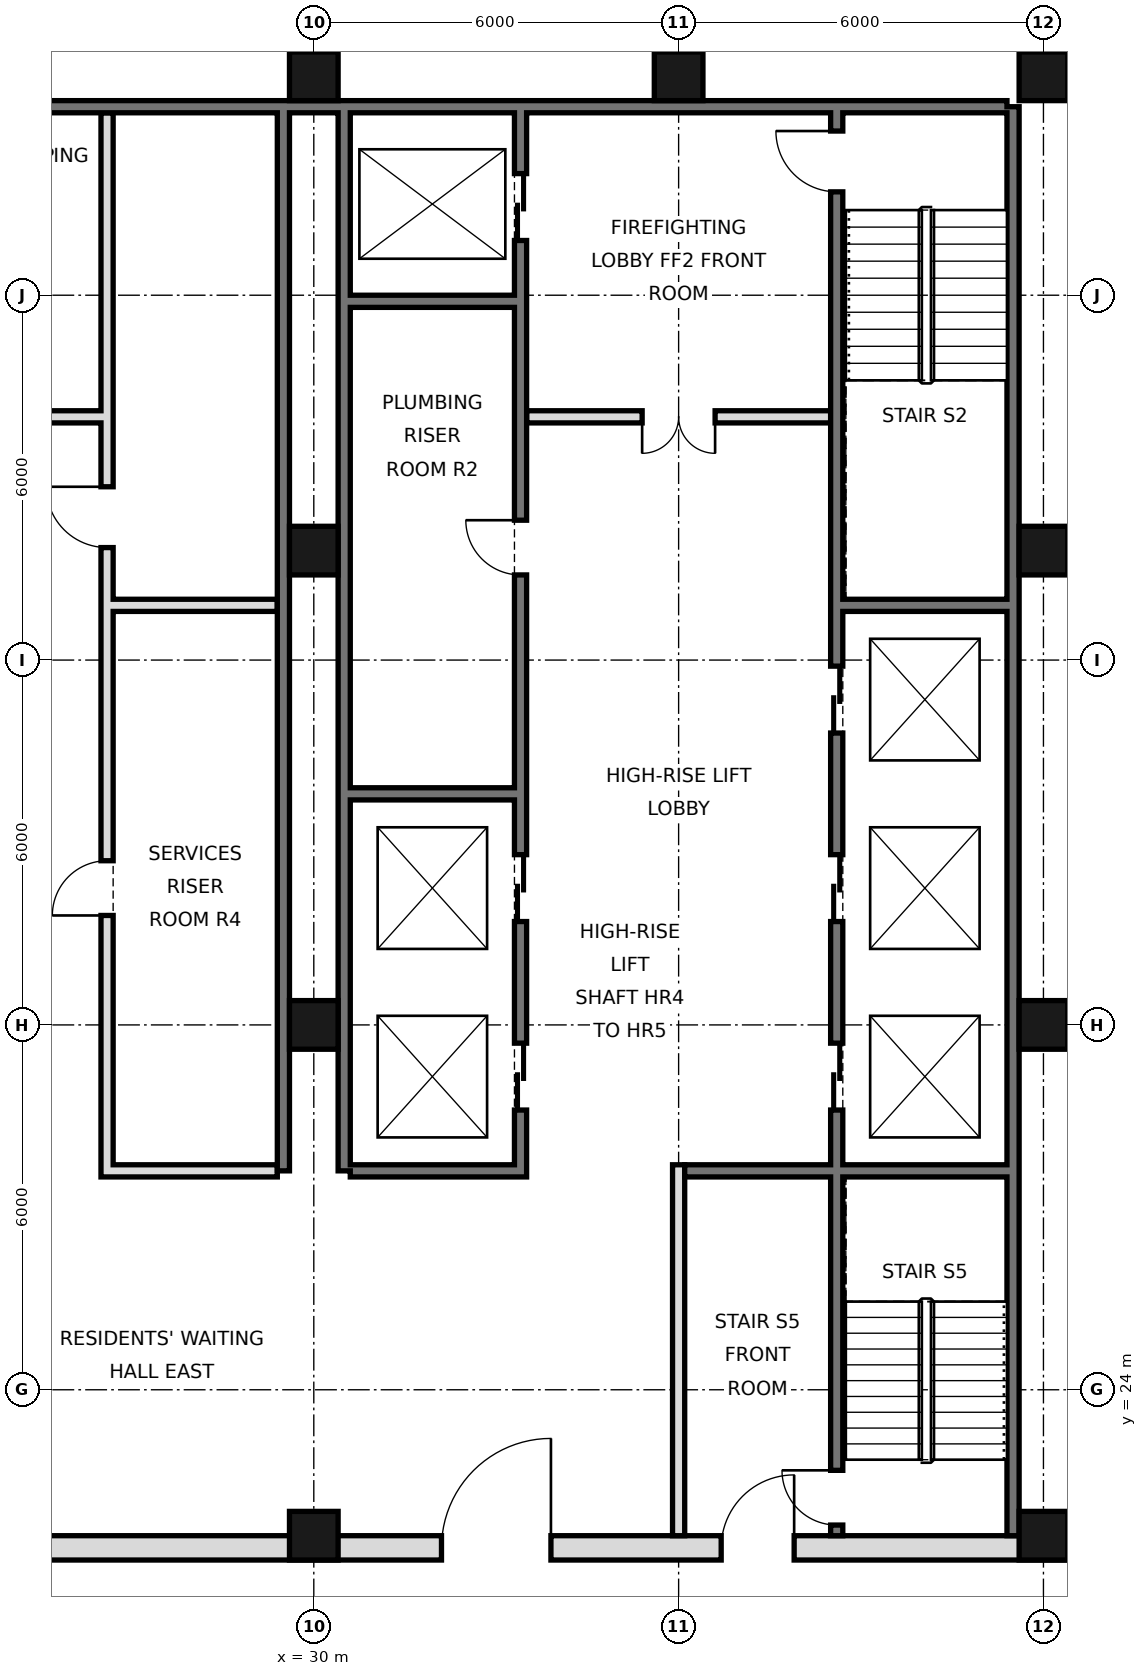
"""IFC4 building model, lengths in metres.
Left out: names, types, materials, properties, quantities, classifications, styles, units other than length and angle.
Written with IfcOpenShell. Run it as: python <this file> out.ifc"""

import sys

from ifc_helpers import new_model, si_unit, direction, frame, frame_2d, origin, origin_2d, place, context, subcontext, project, spatial, rectangle, hollow_rectangle, extrude, element, fill, save


model = new_model("IFC4")
c1 = context("Model", 3, precision=1e-05, world=origin(), true_north=direction((0.0, 1.0)))
c2 = subcontext(c1, "Body", "Model", "MODEL_VIEW")
j1 = project(units=[si_unit("LENGTHUNIT", "METRE"), si_unit("PLANEANGLEUNIT", "RADIAN")], contexts=[c1])
p1 = place(None, origin())
s1 = spatial("IfcSite", under=j1, at=p1, CompositionType="ELEMENT")
p2 = place(p1, origin())
s2 = spatial("IfcBuilding", under=s1, at=p2, CompositionType="ELEMENT")
p3 = place(p2, frame((0.0, 0.0, 319.6)))
s3 = spatial("IfcBuildingStorey", under=s2, at=p3, CompositionType="ELEMENT", Elevation=319.6)
for number, where, z_axis, x_axis in (
    (1, (30.0, 21.6, 0.0), (0.0, 0.0, 1.0), (1.0, 0.0, 0.0)),
    (2, (30.0, 30.0, 0.0), (0.0, 0.0, 1.0), (1.0, 0.0, 0.0)),
    (3, (30.0, 37.8, 0.0), (0.0, 0.0, 1.0), (1.0, 0.0, 0.0)),
    (4, (30.0, 45.6, 0.0), (0.0, 0.0, 1.0), (1.0, 0.0, 0.0)),
    (5, (36.0, 45.6, 0.0), (0.0, 0.0, 1.0), (1.0, 0.0, 0.0)),
    (6, (42.0, 21.6, 0.0), (0.0, 0.0, 1.0), (1.0, 0.0, 0.0)),
    (7, (42.0, 30.0, 0.0), (0.0, 0.0, 1.0), (1.0, 0.0, 0.0)),
    (8, (42.0, 37.8, 0.0), (0.0, 0.0, 1.0), (1.0, 0.0, 0.0)),
    (9, (42.0, 45.6, 0.0), (0.0, 0.0, 1.0), (1.0, 0.0, 0.0)),
):
    element("IfcColumn", number, at=place(p3, frame(where, z_axis=z_axis, x_axis=x_axis)), inside=s3, PredefinedType="COLUMN", context=c2, shape_type="SweptSolid", body=[
        extrude(hollow_rectangle(XDim=0.8, YDim=0.8, WallThickness=0.025, at=origin_2d()), origin(), (0.0, 0.0, 1.0), 3.6),
    ])
p4 = place(p3, frame((41.5, 21.6, 0.0), z_axis=(0.0, 0.0, 1.0), x_axis=(0.0, 1.0, 0.0)))
e10 = element("IfcWall", 10, at=p4, inside=s3, PredefinedType="SOLIDWALL", context=c2, shape_type="SweptSolid", body=[
    extrude(rectangle(XDim=23.5, YDim=0.2, at=frame_2d((11.75, 0.0))), origin(), (0.0, 0.0, 1.0), 3.42),
])
p5 = place(p3, frame((6.6, 45.1, 0.0), z_axis=(0.0, 0.0, 1.0), x_axis=(1.0, 0.0, 0.0)))
e11 = element("IfcWall", 11, at=p5, inside=s3, PredefinedType="SOLIDWALL", context=c2, shape_type="SweptSolid", body=[
    extrude(rectangle(XDim=34.8, YDim=0.2, at=frame_2d((17.4, 0.0))), origin(), (0.0, 0.0, 1.0), 3.42),
])
for number, where, z_axis, x_axis in (
    (12, (29.5, 27.6, 0.0), (0.0, 0.0, 1.0), (0.0, 1.0, 0.0)),
    (13, (30.5, 27.6, 0.0), (0.0, 0.0, 1.0), (0.0, 1.0, 0.0)),
):
    element("IfcWall", number, at=place(p3, frame(where, z_axis=z_axis, x_axis=x_axis)), inside=s3, PredefinedType="SOLIDWALL", context=c2, shape_type="SweptSolid", body=[
        extrude(rectangle(XDim=17.5, YDim=0.2, at=frame_2d((8.75, 0.0))), origin(), (0.0, 0.0, 1.0), 3.42),
    ])
p6 = place(p3, frame((5.6, 21.4, 0.0), z_axis=(0.0, 0.0, 1.0), x_axis=(1.0, 0.0, 0.0)))
e14 = element("IfcWall", 14, at=p6, inside=s3, PredefinedType="SOLIDWALL", context=c2, shape_type="SweptSolid", body=[
    extrude(rectangle(XDim=36.8, YDim=0.4, at=frame_2d((18.4, 0.0))), origin(), (0.0, 0.0, 1.0), 3.42),
])
p7 = place(p6, frame((8.5, 0.0, 0.0)))
e15 = element("IfcOpeningElement", 15, at=p7, cuts=e14, PredefinedType="OPENING", context=c2, shape_type="SweptSolid", body=[
    extrude(rectangle(XDim=1.8, YDim=2.1, at=frame_2d((0.9, 1.05))), frame((0.0, 0.21, 0.0), z_axis=(0.0, -1.0, 0.0), x_axis=(1.0, 0.0, 0.0)), (0.0, 0.0, 1.0), 0.42),
])
p8 = place(p6, frame((17.5, 0.0, 0.0)))
e16 = element("IfcOpeningElement", 16, at=p8, cuts=e14, PredefinedType="OPENING", context=c2, shape_type="SweptSolid", body=[
    extrude(rectangle(XDim=1.8, YDim=2.1, at=frame_2d((0.9, 1.05))), frame((0.0, 0.21, 0.0), z_axis=(0.0, -1.0, 0.0), x_axis=(1.0, 0.0, 0.0)), (0.0, 0.0, 1.0), 0.42),
])
p9 = place(p6, frame((26.5, 0.0, 0.0)))
e17 = element("IfcOpeningElement", 17, at=p9, cuts=e14, PredefinedType="OPENING", context=c2, shape_type="SweptSolid", body=[
    extrude(rectangle(XDim=1.8, YDim=2.1, at=frame_2d((0.9, 1.05))), frame((0.0, 0.21, 0.0), z_axis=(0.0, -1.0, 0.0), x_axis=(1.0, 0.0, 0.0)), (0.0, 0.0, 1.0), 0.42),
])
p10 = place(p6, frame((4.5, 0.0, 0.0)))
e18 = element("IfcOpeningElement", 18, at=p10, cuts=e14, PredefinedType="OPENING", context=c2, shape_type="SweptSolid", body=[
    extrude(rectangle(XDim=1.2, YDim=2.1, at=frame_2d((0.6, 1.05))), frame((0.0, 0.21, 0.0), z_axis=(0.0, -1.0, 0.0), x_axis=(1.0, 0.0, 0.0)), (0.0, 0.0, 1.0), 0.42),
])
p11 = place(p6, frame((31.1, 0.0, 0.0)))
e19 = element("IfcOpeningElement", 19, at=p11, cuts=e14, PredefinedType="OPENING", context=c2, shape_type="SweptSolid", body=[
    extrude(rectangle(XDim=1.2, YDim=2.1, at=frame_2d((0.6, 1.05))), frame((0.0, 0.21, 0.0), z_axis=(0.0, -1.0, 0.0), x_axis=(1.0, 0.0, 0.0)), (0.0, 0.0, 1.0), 0.42),
])
p12 = place(p3, frame((26.6, 27.5, 0.0), z_axis=(0.0, 0.0, 1.0), x_axis=(0.0, 1.0, 0.0)))
e20 = element("IfcWall", 20, at=p12, inside=s3, PredefinedType="SOLIDWALL", context=c2, shape_type="SweptSolid", body=[
    extrude(rectangle(XDim=17.5, YDim=0.2, at=frame_2d((8.75, 0.0))), origin(), (0.0, 0.0, 1.0), 3.42),
])
p13 = place(p12, frame((4.3, 0.0, 0.0)))
e21 = element("IfcOpeningElement", 21, at=p13, cuts=e20, PredefinedType="OPENING", context=c2, shape_type="SweptSolid", body=[
    extrude(rectangle(XDim=0.9, YDim=2.1, at=frame_2d((0.45, 1.05))), frame((0.0, 0.11, 0.0), z_axis=(0.0, -1.0, 0.0), x_axis=(1.0, 0.0, 0.0)), (0.0, 0.0, 1.0), 0.22),
])
p14 = place(p12, frame((10.35, 0.0, 0.0)))
e22 = element("IfcOpeningElement", 22, at=p14, cuts=e20, PredefinedType="OPENING", context=c2, shape_type="SweptSolid", body=[
    extrude(rectangle(XDim=1.0, YDim=2.1, at=frame_2d((0.5, 1.05))), frame((0.0, 0.11, 0.0), z_axis=(0.0, -1.0, 0.0), x_axis=(1.0, 0.0, 0.0)), (0.0, 0.0, 1.0), 0.22),
])
p15 = place(p3, frame((33.4, 27.5, 0.0), z_axis=(0.0, 0.0, 1.0), x_axis=(0.0, 1.0, 0.0)))
e23 = element("IfcWall", 23, at=p15, inside=s3, PredefinedType="SOLIDWALL", context=c2, shape_type="SweptSolid", body=[
    extrude(rectangle(XDim=17.5, YDim=0.2, at=frame_2d((8.75, 0.0))), origin(), (0.0, 0.0, 1.0), 3.42),
])
p16 = place(p15, frame((1.1, 0.0, 0.0)))
e24 = element("IfcOpeningElement", 24, at=p16, cuts=e23, PredefinedType="OPENING", context=c2, shape_type="SweptSolid", body=[
    extrude(rectangle(XDim=1.1, YDim=2.1, at=frame_2d((0.55, 1.05))), frame((0.0, 0.11, 0.0), z_axis=(0.0, -1.0, 0.0), x_axis=(1.0, 0.0, 0.0)), (0.0, 0.0, 1.0), 0.22),
])
p17 = place(p15, frame((4.2, 0.0, 0.0)))
e25 = element("IfcOpeningElement", 25, at=p17, cuts=e23, PredefinedType="OPENING", context=c2, shape_type="SweptSolid", body=[
    extrude(rectangle(XDim=1.1, YDim=2.1, at=frame_2d((0.55, 1.05))), frame((0.0, 0.11, 0.0), z_axis=(0.0, -1.0, 0.0), x_axis=(1.0, 0.0, 0.0)), (0.0, 0.0, 1.0), 0.22),
])
p18 = place(p15, frame((15.4, 0.0, 0.0)))
e26 = element("IfcOpeningElement", 26, at=p18, cuts=e23, PredefinedType="OPENING", context=c2, shape_type="SweptSolid", body=[
    extrude(rectangle(XDim=1.1, YDim=2.1, at=frame_2d((0.55, 1.05))), frame((0.0, 0.11, 0.0), z_axis=(0.0, -1.0, 0.0), x_axis=(1.0, 0.0, 0.0)), (0.0, 0.0, 1.0), 0.22),
])
p19 = place(p15, frame((9.9, 0.0, 0.0)))
e27 = element("IfcOpeningElement", 27, at=p19, cuts=e23, PredefinedType="OPENING", context=c2, shape_type="SweptSolid", body=[
    extrude(rectangle(XDim=0.9, YDim=2.1, at=frame_2d((0.45, 1.05))), frame((0.0, 0.11, 0.0), z_axis=(0.0, -1.0, 0.0), x_axis=(1.0, 0.0, 0.0)), (0.0, 0.0, 1.0), 0.22),
])
p20 = place(p3, frame((36.0, 21.6, 0.0), z_axis=(0.0, 0.0, 1.0), x_axis=(0.0, 1.0, 0.0)))
e28 = element("IfcWall", 28, at=p20, inside=s3, PredefinedType="PARTITIONING", context=c2, shape_type="SweptSolid", body=[
    extrude(rectangle(XDim=6.1, YDim=0.2, at=frame_2d((3.05, 0.0))), origin(), (0.0, 0.0, 1.0), 3.42),
])
p21 = place(p3, frame((38.6, 21.6, 0.0), z_axis=(0.0, 0.0, 1.0), x_axis=(0.0, 1.0, 0.0)))
e29 = element("IfcWall", 29, at=p21, inside=s3, PredefinedType="SOLIDWALL", context=c2, shape_type="SweptSolid", body=[
    extrude(rectangle(XDim=23.4, YDim=0.2, at=frame_2d((11.7, 0.0))), origin(), (0.0, 0.0, 1.0), 3.42),
])
p22 = place(p21, frame((7.0, 0.0, 0.0)))
e30 = element("IfcOpeningElement", 30, at=p22, cuts=e29, PredefinedType="OPENING", context=c2, shape_type="SweptSolid", body=[
    extrude(rectangle(XDim=1.1, YDim=2.1, at=frame_2d((0.55, 1.05))), frame((0.0, 0.11, 0.0), z_axis=(0.0, -1.0, 0.0), x_axis=(1.0, 0.0, 0.0)), (0.0, 0.0, 1.0), 0.22),
])
p23 = place(p21, frame((10.1, 0.0, 0.0)))
e31 = element("IfcOpeningElement", 31, at=p23, cuts=e29, PredefinedType="OPENING", context=c2, shape_type="SweptSolid", body=[
    extrude(rectangle(XDim=1.1, YDim=2.1, at=frame_2d((0.55, 1.05))), frame((0.0, 0.11, 0.0), z_axis=(0.0, -1.0, 0.0), x_axis=(1.0, 0.0, 0.0)), (0.0, 0.0, 1.0), 0.22),
])
p24 = place(p21, frame((13.2, 0.0, 0.0)))
e32 = element("IfcOpeningElement", 32, at=p24, cuts=e29, PredefinedType="OPENING", context=c2, shape_type="SweptSolid", body=[
    extrude(rectangle(XDim=1.1, YDim=2.1, at=frame_2d((0.55, 1.05))), frame((0.0, 0.11, 0.0), z_axis=(0.0, -1.0, 0.0), x_axis=(1.0, 0.0, 0.0)), (0.0, 0.0, 1.0), 0.22),
])
p25 = place(p21, frame((22.1, 0.0, 0.0)))
e33 = element("IfcOpeningElement", 33, at=p25, cuts=e29, PredefinedType="OPENING", context=c2, shape_type="SweptSolid", body=[
    extrude(rectangle(XDim=1.0, YDim=2.1, at=frame_2d((0.5, 1.05))), frame((0.0, 0.11, 0.0), z_axis=(0.0, -1.0, 0.0), x_axis=(1.0, 0.0, 0.0)), (0.0, 0.0, 1.0), 0.22),
])
p26 = place(p21, frame((0.175, 0.0, 0.0)))
e34 = element("IfcOpeningElement", 34, at=p26, cuts=e29, PredefinedType="OPENING", context=c2, shape_type="SweptSolid", body=[
    extrude(rectangle(XDim=0.9, YDim=2.1, at=frame_2d((0.45, 1.05))), frame((0.0, 0.11, 0.0), z_axis=(0.0, -1.0, 0.0), x_axis=(1.0, 0.0, 0.0)), (0.0, 0.0, 1.0), 0.22),
])
for number, where, z_axis, x_axis in (
    (35, (26.7, 27.6, 0.0), (0.0, 0.0, 1.0), (1.0, 0.0, 0.0)),
    (36, (30.6, 27.6, 0.0), (0.0, 0.0, 1.0), (1.0, 0.0, 0.0)),
):
    element("IfcWall", number, at=place(p3, frame(where, z_axis=z_axis, x_axis=x_axis)), inside=s3, PredefinedType="SOLIDWALL", context=c2, shape_type="SweptSolid", body=[
        extrude(rectangle(XDim=2.7, YDim=0.2, at=frame_2d((1.35, 0.0))), origin(), (0.0, 0.0, 1.0), 3.42),
    ])
p27 = place(p3, frame((36.1, 27.6, 0.0), z_axis=(0.0, 0.0, 1.0), x_axis=(1.0, 0.0, 0.0)))
e37 = element("IfcWall", 37, at=p27, inside=s3, PredefinedType="SOLIDWALL", context=c2, shape_type="SweptSolid", body=[
    extrude(rectangle(XDim=5.3, YDim=0.2, at=frame_2d((2.65, 0.0))), origin(), (0.0, 0.0, 1.0), 3.42),
])
for number, where, z_axis, x_axis in (
    (38, (30.6, 33.8, 0.0), (0.0, 0.0, 1.0), (1.0, 0.0, 0.0)),
    (39, (26.7, 36.9, 0.0), (0.0, 0.0, 1.0), (1.0, 0.0, 0.0)),
    (40, (38.7, 36.9, 0.0), (0.0, 0.0, 1.0), (1.0, 0.0, 0.0)),
):
    element("IfcWall", number, at=place(p3, frame(where, z_axis=z_axis, x_axis=x_axis)), inside=s3, PredefinedType="SOLIDWALL", context=c2, shape_type="SweptSolid", body=[
        extrude(rectangle(XDim=2.7, YDim=0.2, at=frame_2d((1.35, 0.0))), origin(), (0.0, 0.0, 1.0), 3.42),
    ])
p28 = place(p3, frame((21.5, 40.0, 0.0), z_axis=(0.0, 0.0, 1.0), x_axis=(1.0, 0.0, 0.0)))
e41 = element("IfcWall", 41, at=p28, inside=s3, PredefinedType="PARTITIONING", context=c2, shape_type="SweptSolid", body=[
    extrude(rectangle(XDim=5.0, YDim=0.2, at=frame_2d((2.5, 0.0))), origin(), (0.0, 0.0, 1.0), 3.42),
])
p29 = place(p28, frame((1.9, 0.0, 0.0)))
e42 = element("IfcOpeningElement", 42, at=p29, cuts=e41, PredefinedType="OPENING", context=c2, shape_type="SweptSolid", body=[
    extrude(rectangle(XDim=1.2, YDim=2.1, at=frame_2d((0.6, 1.05))), frame((0.0, 0.11, 0.0), z_axis=(0.0, -1.0, 0.0), x_axis=(1.0, 0.0, 0.0)), (0.0, 0.0, 1.0), 0.22),
])
p30 = place(p3, frame((33.5, 40.0, 0.0), z_axis=(0.0, 0.0, 1.0), x_axis=(1.0, 0.0, 0.0)))
e43 = element("IfcWall", 43, at=p30, inside=s3, PredefinedType="PARTITIONING", context=c2, shape_type="SweptSolid", body=[
    extrude(rectangle(XDim=5.0, YDim=0.2, at=frame_2d((2.5, 0.0))), origin(), (0.0, 0.0, 1.0), 3.42),
])
p31 = place(p30, frame((1.9, 0.0, 0.0)))
e44 = element("IfcOpeningElement", 44, at=p31, cuts=e43, PredefinedType="OPENING", context=c2, shape_type="SweptSolid", body=[
    extrude(rectangle(XDim=1.2, YDim=2.1, at=frame_2d((0.6, 1.05))), frame((0.0, 0.11, 0.0), z_axis=(0.0, -1.0, 0.0), x_axis=(1.0, 0.0, 0.0)), (0.0, 0.0, 1.0), 0.22),
])
p32 = place(p3, frame((30.6, 41.9, 0.0), z_axis=(0.0, 0.0, 1.0), x_axis=(1.0, 0.0, 0.0)))
e45 = element("IfcWall", 45, at=p32, inside=s3, PredefinedType="SOLIDWALL", context=c2, shape_type="SweptSolid", body=[
    extrude(rectangle(XDim=2.7, YDim=0.2, at=frame_2d((1.35, 0.0))), origin(), (0.0, 0.0, 1.0), 3.42),
])
p33 = place(p9, frame((1.8, 0.0, 0.0), z_axis=(0.0, 0.0, 1.0), x_axis=(-1.0, 0.0, 0.0)))
e46 = element("IfcDoor", 46, at=p33, inside=s3, OperationType="SINGLE_SWING_LEFT", PredefinedType="DOOR", context=c2, shape_type="SweptSolid", body=[
    extrude(rectangle(XDim=1.8, YDim=2.1, at=frame_2d((0.9, 1.05))), frame((0.0, 0.025, 0.0), z_axis=(0.0, -1.0, 0.0), x_axis=(1.0, 0.0, 0.0)), (0.0, 0.0, 1.0), 0.05),
])
fill(e17, e46)
p34 = place(p11, frame((1.2, 0.0, 0.0), z_axis=(0.0, 0.0, 1.0), x_axis=(-1.0, 0.0, 0.0)))
e47 = element("IfcDoor", 47, at=p34, inside=s3, OperationType="SINGLE_SWING_LEFT", PredefinedType="DOOR", context=c2, shape_type="SweptSolid", body=[
    extrude(rectangle(XDim=1.2, YDim=2.1, at=frame_2d((0.6, 1.05))), frame((0.0, 0.025, 0.0), z_axis=(0.0, -1.0, 0.0), x_axis=(1.0, 0.0, 0.0)), (0.0, 0.0, 1.0), 0.05),
])
fill(e19, e47)
p35 = place(p31, frame((1.2, 0.0, 0.0), z_axis=(0.0, 0.0, 1.0), x_axis=(-1.0, 0.0, 0.0)))
e48 = element("IfcDoor", 48, at=p35, inside=s3, OperationType="DOUBLE_DOOR_SINGLE_SWING", PredefinedType="DOOR", context=c2, shape_type="SweptSolid", body=[
    extrude(rectangle(XDim=1.2, YDim=2.1, at=frame_2d((0.6, 1.05))), frame((0.0, 0.025, 0.0), z_axis=(0.0, -1.0, 0.0), x_axis=(1.0, 0.0, 0.0)), (0.0, 0.0, 1.0), 0.05),
])
fill(e44, e48)
p36 = place(p22, origin())
e49 = element("IfcDoor", 49, at=p36, inside=s3, OperationType="DOUBLE_DOOR_SLIDING", PredefinedType="DOOR", context=c2, shape_type="SweptSolid", body=[
    extrude(rectangle(XDim=1.1, YDim=2.1, at=frame_2d((0.55, 1.05))), frame((0.0, 0.025, 0.0), z_axis=(0.0, -1.0, 0.0), x_axis=(1.0, 0.0, 0.0)), (0.0, 0.0, 1.0), 0.05),
])
fill(e30, e49)
p37 = place(p23, origin())
e50 = element("IfcDoor", 50, at=p37, inside=s3, OperationType="DOUBLE_DOOR_SLIDING", PredefinedType="DOOR", context=c2, shape_type="SweptSolid", body=[
    extrude(rectangle(XDim=1.1, YDim=2.1, at=frame_2d((0.55, 1.05))), frame((0.0, 0.025, 0.0), z_axis=(0.0, -1.0, 0.0), x_axis=(1.0, 0.0, 0.0)), (0.0, 0.0, 1.0), 0.05),
])
fill(e31, e50)
p38 = place(p24, origin())
e51 = element("IfcDoor", 51, at=p38, inside=s3, OperationType="DOUBLE_DOOR_SLIDING", PredefinedType="DOOR", context=c2, shape_type="SweptSolid", body=[
    extrude(rectangle(XDim=1.1, YDim=2.1, at=frame_2d((0.55, 1.05))), frame((0.0, 0.025, 0.0), z_axis=(0.0, -1.0, 0.0), x_axis=(1.0, 0.0, 0.0)), (0.0, 0.0, 1.0), 0.05),
])
fill(e32, e51)
p39 = place(p16, origin())
e52 = element("IfcDoor", 52, at=p39, inside=s3, OperationType="DOUBLE_DOOR_SLIDING", PredefinedType="DOOR", context=c2, shape_type="SweptSolid", body=[
    extrude(rectangle(XDim=1.1, YDim=2.1, at=frame_2d((0.55, 1.05))), frame((0.0, 0.025, 0.0), z_axis=(0.0, -1.0, 0.0), x_axis=(1.0, 0.0, 0.0)), (0.0, 0.0, 1.0), 0.05),
])
fill(e24, e52)
p40 = place(p17, origin())
e53 = element("IfcDoor", 53, at=p40, inside=s3, OperationType="DOUBLE_DOOR_SLIDING", PredefinedType="DOOR", context=c2, shape_type="SweptSolid", body=[
    extrude(rectangle(XDim=1.1, YDim=2.1, at=frame_2d((0.55, 1.05))), frame((0.0, 0.025, 0.0), z_axis=(0.0, -1.0, 0.0), x_axis=(1.0, 0.0, 0.0)), (0.0, 0.0, 1.0), 0.05),
])
fill(e25, e53)
p41 = place(p18, origin())
e54 = element("IfcDoor", 54, at=p41, inside=s3, OperationType="DOUBLE_DOOR_SLIDING", PredefinedType="DOOR", context=c2, shape_type="SweptSolid", body=[
    extrude(rectangle(XDim=1.1, YDim=2.1, at=frame_2d((0.55, 1.05))), frame((0.0, 0.025, 0.0), z_axis=(0.0, -1.0, 0.0), x_axis=(1.0, 0.0, 0.0)), (0.0, 0.0, 1.0), 0.05),
])
fill(e26, e54)
p42 = place(p25, frame((1.0, 0.0, 0.0), z_axis=(0.0, 0.0, 1.0), x_axis=(-1.0, 0.0, 0.0)))
e55 = element("IfcDoor", 55, at=p42, inside=s3, OperationType="SINGLE_SWING_LEFT", PredefinedType="DOOR", context=c2, shape_type="SweptSolid", body=[
    extrude(rectangle(XDim=1.0, YDim=2.1, at=frame_2d((0.5, 1.05))), frame((0.0, 0.025, 0.0), z_axis=(0.0, -1.0, 0.0), x_axis=(1.0, 0.0, 0.0)), (0.0, 0.0, 1.0), 0.05),
])
fill(e33, e55)
p43 = place(p26, frame((0.9, 0.0, 0.0), z_axis=(0.0, 0.0, 1.0), x_axis=(-1.0, 0.0, 0.0)))
e56 = element("IfcDoor", 56, at=p43, inside=s3, OperationType="SINGLE_SWING_LEFT", PredefinedType="DOOR", context=c2, shape_type="SweptSolid", body=[
    extrude(rectangle(XDim=0.9, YDim=2.1, at=frame_2d((0.45, 1.05))), frame((0.0, 0.025, 0.0), z_axis=(0.0, -1.0, 0.0), x_axis=(1.0, 0.0, 0.0)), (0.0, 0.0, 1.0), 0.05),
])
fill(e34, e56)
p44 = place(p19, frame((0.9, 0.0, 0.0), z_axis=(0.0, 0.0, 1.0), x_axis=(-1.0, 0.0, 0.0)))
e57 = element("IfcDoor", 57, at=p44, inside=s3, OperationType="SINGLE_SWING_LEFT", PredefinedType="DOOR", context=c2, shape_type="SweptSolid", body=[
    extrude(rectangle(XDim=0.9, YDim=2.1, at=frame_2d((0.45, 1.05))), frame((0.0, 0.025, 0.0), z_axis=(0.0, -1.0, 0.0), x_axis=(1.0, 0.0, 0.0)), (0.0, 0.0, 1.0), 0.05),
])
fill(e27, e57)
p45 = place(p13, origin())
e58 = element("IfcDoor", 58, at=p45, inside=s3, OperationType="SINGLE_SWING_LEFT", PredefinedType="DOOR", context=c2, shape_type="SweptSolid", body=[
    extrude(rectangle(XDim=0.9, YDim=2.1, at=frame_2d((0.45, 1.05))), frame((0.0, 0.025, 0.0), z_axis=(0.0, -1.0, 0.0), x_axis=(1.0, 0.0, 0.0)), (0.0, 0.0, 1.0), 0.05),
])
fill(e21, e58)
p46 = place(p14, frame((1.0, 0.0, 0.0), z_axis=(0.0, 0.0, 1.0), x_axis=(-1.0, 0.0, 0.0)))
e59 = element("IfcDoor", 59, at=p46, inside=s3, OperationType="SINGLE_SWING_LEFT", PredefinedType="DOOR", context=c2, shape_type="SweptSolid", body=[
    extrude(rectangle(XDim=1.0, YDim=2.1, at=frame_2d((0.5, 1.05))), frame((0.0, 0.025, 0.0), z_axis=(0.0, -1.0, 0.0), x_axis=(1.0, 0.0, 0.0)), (0.0, 0.0, 1.0), 0.05),
])
fill(e22, e59)
save(model, sys.argv[1])
